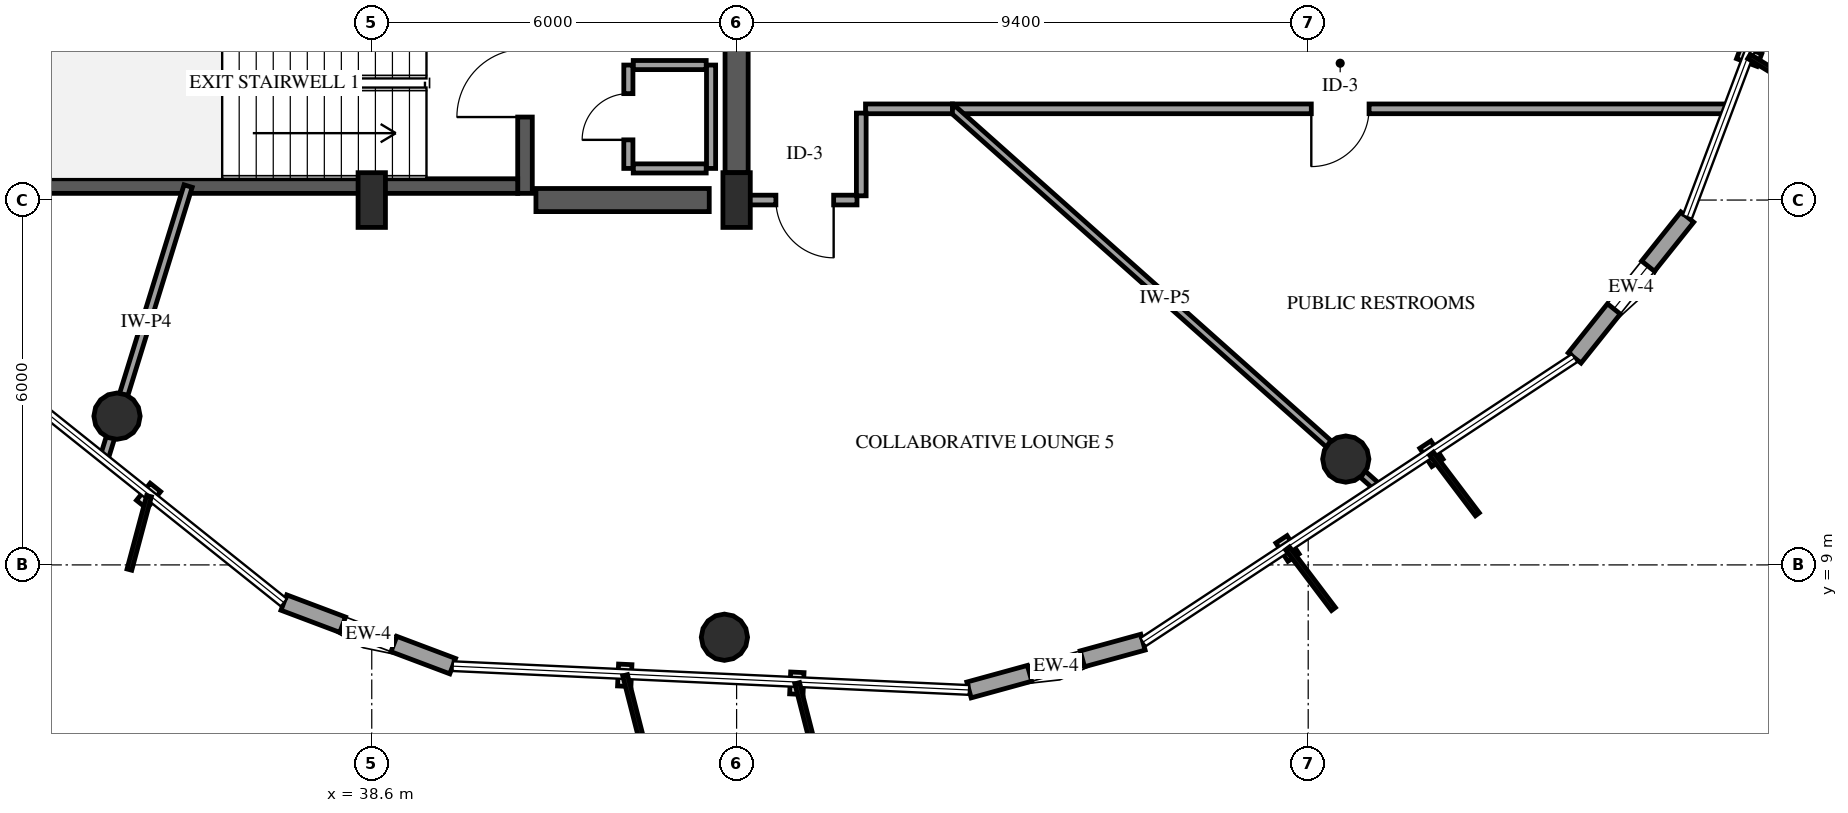
"""IFC4 building model, lengths in metres.
Left out: names, types, materials, properties, quantities, classifications, styles, units other than length and angle.
Written with IfcOpenShell. Run it as: python <this file> out.ifc"""

import sys

from ifc_helpers import new_model, si_unit, direction, frame, frame_2d, origin, origin_2d, place, context, subcontext, project, spatial, rectangle, hollow_circle, extrude, element, fill, save


model = new_model("IFC4")
c1 = context("Model", 3, precision=1e-05, world=origin(), true_north=direction((0.0, 1.0)))
c2 = subcontext(c1, "Body", "Model", "MODEL_VIEW")
j1 = project(units=[si_unit("LENGTHUNIT", "METRE"), si_unit("PLANEANGLEUNIT", "RADIAN")], contexts=[c1])
p1 = place(None, origin())
s1 = spatial("IfcSite", under=j1, at=p1, CompositionType="ELEMENT")
p2 = place(p1, origin())
s2 = spatial("IfcBuilding", under=s1, at=p2, CompositionType="ELEMENT")
p3 = place(p2, frame((0.0, 0.0, 288.55)))
s3 = spatial("IfcBuildingStorey", under=s2, at=p3, CompositionType="ELEMENT", Elevation=288.55)
p4 = place(p3, frame((41.12, 15.11, 0.0), z_axis=(0.0, 0.0, 1.0), x_axis=(0.0, 1.0, 0.0)))
e1 = element("IfcWall", 1, at=p4, inside=s3, PredefinedType="SHEAR", context=c2, shape_type="SweptSolid", body=[
    extrude(rectangle(XDim=3.63, YDim=0.24, at=frame_2d((1.815, 0.0))), origin(), (0.0, 0.0, 1.0), 4.5),
])
p5 = place(p4, frame((1.255, 0.0, 0.0)))
e2 = element("IfcOpeningElement", 2, at=p5, cuts=e1, PredefinedType="OPENING", context=c2, shape_type="SweptSolid", body=[
    extrude(rectangle(XDim=1.12, YDim=2.15, at=frame_2d((0.56, 1.075))), frame((0.0, 0.13, 0.0), z_axis=(0.0, -1.0, 0.0), x_axis=(1.0, 0.0, 0.0)), (0.0, 0.0, 1.0), 0.26),
])
p6 = place(p3, frame((33.0, 15.23, 0.0), z_axis=(0.0, 0.0, 1.0), x_axis=(1.0, 0.0, 0.0)))
e3 = element("IfcWall", 3, at=p6, inside=s3, PredefinedType="SHEAR", context=c2, shape_type="SweptSolid", body=[
    extrude(rectangle(XDim=8.0, YDim=0.24, at=frame_2d((4.0, 0.0))), origin(), (0.0, 0.0, 1.0), 4.5),
])
p7 = place(p3, frame((41.3, 15.0, 0.0), z_axis=(0.0, 0.0, 1.0), x_axis=(1.0, 0.0, 0.0)))
e4 = element("IfcWall", 4, at=p7, inside=s3, PredefinedType="SHEAR", context=c2, shape_type="SweptSolid", body=[
    extrude(rectangle(XDim=2.85, YDim=0.38, at=frame_2d((1.425, 0.0))), origin(), (0.0, 0.0, 1.0), 4.5),
])
p8 = place(p3, frame((44.6, 15.45, 0.0), z_axis=(0.0, 0.0, 1.0), x_axis=(0.0, 1.0, 0.0)))
e5 = element("IfcWall", 5, at=p8, inside=s3, PredefinedType="SHEAR", context=c2, shape_type="SweptSolid", body=[
    extrude(rectangle(XDim=6.35, YDim=0.38, at=frame_2d((3.175, 0.0))), origin(), (0.0, 0.0, 1.0), 4.5),
])
for number, where, z_axis, x_axis in (
    (6, (38.6, 15.0, 0.0), (0.0, 0.0, 1.0), (1.0, 0.0, 0.0)),
    (7, (44.6, 15.0, 0.0), (0.0, 0.0, 1.0), (1.0, 0.0, 0.0)),
):
    element("IfcColumn", number, at=place(p3, frame(where, z_axis=z_axis, x_axis=x_axis)), inside=s3, PredefinedType="PILASTER", context=c2, shape_type="SweptSolid", body=[
        extrude(rectangle(XDim=0.45, YDim=0.9, at=origin_2d()), origin(), (0.0, 0.0, 1.0), 4.195),
    ])
for number, where, z_axis, x_axis in (
    (8, (34.411, 11.446, 0.0), (0.0, 0.0, 1.0), (1.0, 0.0, 0.0)),
    (9, (44.4, 7.811, 0.0), (0.0, 0.0, 1.0), (1.0, 0.0, 0.0)),
    (10, (54.618, 10.74, 0.0), (0.0, 0.0, 1.0), (1.0, 0.0, 0.0)),
):
    element("IfcColumn", number, at=place(p3, frame(where, z_axis=z_axis, x_axis=x_axis)), inside=s3, PredefinedType="COLUMN", context=c2, shape_type="SweptSolid", body=[
        extrude(hollow_circle(Radius=0.381, WallThickness=0.025, at=origin_2d()), origin(), (0.0, 0.0, 1.0), 4.165),
    ])
p9 = place(p3, frame((37.155, 8.381, 0.0), z_axis=(0.0, 0.0, 1.0), x_axis=(0.935827708893, -0.352457797853, 0.0)))
e11 = element("IfcWall", 11, at=p9, inside=s3, PredefinedType="SOLIDWALL", context=c2, shape_type="SweptSolid", body=[
    extrude(rectangle(XDim=2.967, YDim=0.27, at=frame_2d((1.483, 0.0))), origin(), (0.0, 0.0, 1.0), 3.574),
])
p10 = place(p9, frame((1.033, 0.0, 0.75)))
e12 = element("IfcOpeningElement", 12, at=p10, cuts=e11, PredefinedType="OPENING", context=c2, shape_type="SweptSolid", body=[
    extrude(rectangle(XDim=0.9, YDim=1.5, at=frame_2d((0.45, 0.75))), frame((0.0, 0.145, 0.0), z_axis=(0.0, -1.0, 0.0), x_axis=(1.0, 0.0, 0.0)), (0.0, 0.0, 1.0), 0.29),
])
p11 = place(p3, frame((48.422, 6.943, 0.0), z_axis=(0.0, 0.0, 1.0), x_axis=(0.964272165629, 0.264913553056, 0.0)))
e13 = element("IfcWall", 13, at=p11, inside=s3, PredefinedType="SOLIDWALL", context=c2, shape_type="SweptSolid", body=[
    extrude(rectangle(XDim=2.967, YDim=0.27, at=frame_2d((1.483, 0.0))), origin(), (0.0, 0.0, 1.0), 3.574),
])
p12 = place(p11, frame((1.033, 0.0, 0.75)))
e14 = element("IfcOpeningElement", 14, at=p12, cuts=e13, PredefinedType="OPENING", context=c2, shape_type="SweptSolid", body=[
    extrude(rectangle(XDim=0.9, YDim=1.5, at=frame_2d((0.45, 0.75))), frame((0.0, 0.145, 0.0), z_axis=(0.0, -1.0, 0.0), x_axis=(1.0, 0.0, 0.0)), (0.0, 0.0, 1.0), 0.29),
])
p13 = place(p3, frame((58.382, 12.403, 0.0), z_axis=(0.0, 0.0, 1.0), x_axis=(0.624444087009, 0.781069511759, 0.0)))
e15 = element("IfcWall", 15, at=p13, inside=s3, PredefinedType="SOLIDWALL", context=c2, shape_type="SweptSolid", body=[
    extrude(rectangle(XDim=2.966, YDim=0.27, at=frame_2d((1.483, 0.0))), origin(), (0.0, 0.0, 1.0), 3.574),
])
p14 = place(p13, frame((1.033, 0.0, 0.75)))
e16 = element("IfcOpeningElement", 16, at=p14, cuts=e15, PredefinedType="OPENING", context=c2, shape_type="SweptSolid", body=[
    extrude(rectangle(XDim=0.9, YDim=1.5, at=frame_2d((0.45, 0.75))), frame((0.0, 0.145, 0.0), z_axis=(0.0, -1.0, 0.0), x_axis=(1.0, 0.0, 0.0)), (0.0, 0.0, 1.0), 0.29),
])
for number, where, z_axis, x_axis in (
    (17, (42.9, 15.52, 0.0), (0.0, 0.0, 1.0), (1.0, 0.0, 0.0)),
    (18, (42.9, 17.22, 0.0), (0.0, 0.0, 1.0), (1.0, 0.0, 0.0)),
):
    element("IfcWall", number, at=place(p3, frame(where, z_axis=z_axis, x_axis=x_axis)), inside=s3, PredefinedType="PARTITIONING", context=c2, shape_type="SweptSolid", body=[
        extrude(rectangle(XDim=1.2, YDim=0.15, at=frame_2d((0.6, 0.0))), origin(), (0.0, 0.0, 1.0), 4.195),
    ])
p15 = place(p3, frame((44.18, 15.52, 0.0), z_axis=(0.0, 0.0, 1.0), x_axis=(0.0, 1.0, 0.0)))
e19 = element("IfcWall", 19, at=p15, inside=s3, PredefinedType="PARTITIONING", context=c2, shape_type="SweptSolid", body=[
    extrude(rectangle(XDim=1.7, YDim=0.15, at=frame_2d((0.85, 0.0))), origin(), (0.0, 0.0, 1.0), 4.195),
])
p16 = place(p3, frame((42.82, 15.52, 0.0), z_axis=(0.0, 0.0, 1.0), x_axis=(0.0, 1.0, 0.0)))
e20 = element("IfcWall", 20, at=p16, inside=s3, PredefinedType="PARTITIONING", context=c2, shape_type="SweptSolid", body=[
    extrude(rectangle(XDim=1.7, YDim=0.15, at=frame_2d((0.85, 0.0))), origin(), (0.0, 0.0, 1.0), 4.195),
])
p17 = place(p16, frame((0.47, 0.0, 0.0)))
e21 = element("IfcOpeningElement", 21, at=p17, cuts=e20, PredefinedType="OPENING", context=c2, shape_type="SweptSolid", body=[
    extrude(rectangle(XDim=0.76, YDim=2.0, at=frame_2d((0.38, 1.0))), frame((0.0, 0.085, 0.0), z_axis=(0.0, -1.0, 0.0), x_axis=(1.0, 0.0, 0.0)), (0.0, 0.0, 1.0), 0.17),
])
p18 = place(p3, frame((60.904, 16.5, 0.0), z_axis=(0.0, 0.0, 1.0), x_axis=(-1.0, 0.0, 0.0)))
e22 = element("IfcWall", 22, at=p18, inside=s3, PredefinedType="PARTITIONING", context=c2, shape_type="SweptSolid", body=[
    extrude(rectangle(XDim=12.755, YDim=0.16, at=frame_2d((6.377, 0.0))), origin(), (0.0, 0.0, 1.0), 2.265),
])
p19 = place(p18, frame((5.903, 0.0, 0.0)))
e23 = element("IfcOpeningElement", 23, at=p19, cuts=e22, PredefinedType="OPENING", context=c2, shape_type="SweptSolid", body=[
    extrude(rectangle(XDim=0.95, YDim=2.15, at=frame_2d((0.475, 1.075))), frame((0.0, 0.09, 0.0), z_axis=(0.0, -1.0, 0.0), x_axis=(1.0, 0.0, 0.0)), (0.0, 0.0, 1.0), 0.18),
])
p20 = place(p3, frame((48.149, 16.5, 0.0), z_axis=(0.0, 0.0, 1.0), x_axis=(0.746871195019, -0.664968734641, 0.0)))
e24 = element("IfcWall", 24, at=p20, inside=s3, PredefinedType="PARTITIONING", context=c2, shape_type="SweptSolid", body=[
    extrude(rectangle(XDim=9.366, YDim=0.13, at=frame_2d((4.683, 0.0))), origin(), (0.0, 0.0, 1.0), 4.195),
])
p21 = place(p3, frame((35.58, 15.23, 0.0), z_axis=(0.0, 0.0, 1.0), x_axis=(-0.295186233407, -0.955439735204, 0.0)))
e25 = element("IfcWall", 25, at=p21, inside=s3, PredefinedType="PARTITIONING", context=c2, shape_type="SweptSolid", body=[
    extrude(rectangle(XDim=4.692, YDim=0.14, at=frame_2d((2.346, 0.0))), origin(), (0.0, 0.0, 1.0), 2.485),
])
p22 = place(p3, frame((46.58, 15.0, 0.0), z_axis=(0.0, 0.0, 1.0), x_axis=(-1.0, 0.0, 0.0)))
e26 = element("IfcWall", 26, at=p22, inside=s3, PredefinedType="PARTITIONING", context=c2, shape_type="SweptSolid", body=[
    extrude(rectangle(XDim=1.91, YDim=0.16, at=frame_2d((0.955, 0.0))), origin(), (0.0, 0.0, 1.0), 4.195),
])
p23 = place(p22, frame((0.384, 0.0, 0.0)))
e27 = element("IfcOpeningElement", 27, at=p23, cuts=e26, PredefinedType="OPENING", context=c2, shape_type="SweptSolid", body=[
    extrude(rectangle(XDim=0.95, YDim=2.15, at=frame_2d((0.475, 1.075))), frame((0.0, 0.09, 0.0), z_axis=(0.0, -1.0, 0.0), x_axis=(1.0, 0.0, 0.0)), (0.0, 0.0, 1.0), 0.18),
])
p24 = place(p3, frame((48.149, 16.5, 0.0), z_axis=(0.0, 0.0, 1.0), x_axis=(-1.0, 0.0, 0.0)))
e28 = element("IfcWall", 28, at=p24, inside=s3, PredefinedType="PARTITIONING", context=c2, shape_type="SweptSolid", body=[
    extrude(rectangle(XDim=1.429, YDim=0.16, at=frame_2d((0.714, 0.0))), origin(), (0.0, 0.0, 1.0), 4.195),
])
p25 = place(p3, frame((46.65, 16.43, 0.0), z_axis=(0.0, 0.0, 1.0), x_axis=(0.0, -1.0, 0.0)))
e29 = element("IfcWall", 29, at=p25, inside=s3, PredefinedType="PARTITIONING", context=c2, shape_type="SweptSolid", body=[
    extrude(rectangle(XDim=1.36, YDim=0.16, at=frame_2d((0.68, 0.0))), origin(), (0.0, 0.0, 1.0), 4.195),
])
p26 = place(p10, origin())
e30 = element("IfcWindow", 30, at=p26, inside=s3, PartitioningType="SINGLE_PANEL", PredefinedType="WINDOW", context=c2, shape_type="SweptSolid", body=[
    extrude(rectangle(XDim=0.9, YDim=1.5, at=frame_2d((0.45, 0.75))), frame((0.0, 0.03, 0.0), z_axis=(0.0, -1.0, 0.0), x_axis=(1.0, 0.0, 0.0)), (0.0, 0.0, 1.0), 0.06),
])
fill(e12, e30)
p27 = place(p12, origin())
e31 = element("IfcWindow", 31, at=p27, inside=s3, PartitioningType="SINGLE_PANEL", PredefinedType="WINDOW", context=c2, shape_type="SweptSolid", body=[
    extrude(rectangle(XDim=0.9, YDim=1.5, at=frame_2d((0.45, 0.75))), frame((0.0, 0.03, 0.0), z_axis=(0.0, -1.0, 0.0), x_axis=(1.0, 0.0, 0.0)), (0.0, 0.0, 1.0), 0.06),
])
fill(e14, e31)
p28 = place(p14, origin())
e32 = element("IfcWindow", 32, at=p28, inside=s3, PartitioningType="SINGLE_PANEL", PredefinedType="WINDOW", context=c2, shape_type="SweptSolid", body=[
    extrude(rectangle(XDim=0.9, YDim=1.5, at=frame_2d((0.45, 0.75))), frame((0.0, 0.03, 0.0), z_axis=(0.0, -1.0, 0.0), x_axis=(1.0, 0.0, 0.0)), (0.0, 0.0, 1.0), 0.06),
])
fill(e16, e32)
p29 = place(p5, origin())
e33 = element("IfcDoor", 33, at=p29, inside=s3, OperationType="SINGLE_SWING_LEFT", PredefinedType="DOOR", context=c2, shape_type="SweptSolid", body=[
    extrude(rectangle(XDim=1.12, YDim=2.15, at=frame_2d((0.56, 1.075))), frame((0.0, 0.025, 0.0), z_axis=(0.0, -1.0, 0.0), x_axis=(1.0, 0.0, 0.0)), (0.0, 0.0, 1.0), 0.05),
])
fill(e2, e33)
p30 = place(p17, origin())
e34 = element("IfcDoor", 34, at=p30, inside=s3, OperationType="SINGLE_SWING_LEFT", PredefinedType="TRAPDOOR", context=c2, shape_type="SweptSolid", body=[
    extrude(rectangle(XDim=0.76, YDim=2.0, at=frame_2d((0.38, 1.0))), frame((0.0, 0.025, 0.0), z_axis=(0.0, -1.0, 0.0), x_axis=(1.0, 0.0, 0.0)), (0.0, 0.0, 1.0), 0.05),
])
fill(e21, e34)
p31 = place(p19, origin())
e35 = element("IfcDoor", 35, at=p31, inside=s3, OperationType="SINGLE_SWING_RIGHT", PredefinedType="DOOR", context=c2, shape_type="SweptSolid", body=[
    extrude(rectangle(XDim=0.95, YDim=2.15, at=frame_2d((0.475, 1.075))), frame((0.0, 0.025, 0.0), z_axis=(0.0, -1.0, 0.0), x_axis=(1.0, 0.0, 0.0)), (0.0, 0.0, 1.0), 0.05),
])
fill(e23, e35)
p32 = place(p23, origin())
e36 = element("IfcDoor", 36, at=p32, inside=s3, OperationType="SINGLE_SWING_LEFT", PredefinedType="DOOR", context=c2, shape_type="SweptSolid", body=[
    extrude(rectangle(XDim=0.95, YDim=2.15, at=frame_2d((0.475, 1.075))), frame((0.0, 0.025, 0.0), z_axis=(0.0, -1.0, 0.0), x_axis=(1.0, 0.0, 0.0)), (0.0, 0.0, 1.0), 0.05),
])
fill(e27, e36)
save(model, sys.argv[1])
